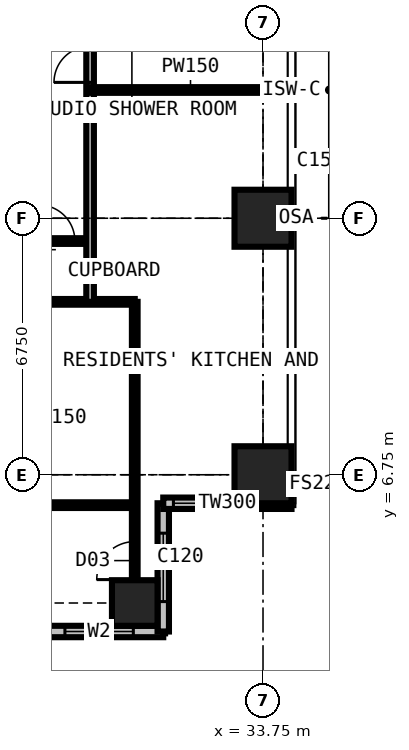
"""IFC4 building model, lengths in metres.
Left out: names, types, materials, properties, quantities, classifications, styles, units other than length and angle.
Written with IfcOpenShell. Run it as: python <this file> out.ifc"""

import sys

from ifc_helpers import new_model, si_unit, direction, frame, frame_2d, origin, origin_2d, place, context, subcontext, project, spatial, rectangle, extrude, element, fill, save


model = new_model("IFC4")
c1 = context("Model", 3, precision=1e-05, world=origin(), true_north=direction((0.0, 1.0)))
c2 = subcontext(c1, "Body", "Model", "MODEL_VIEW")
j1 = project(units=[si_unit("LENGTHUNIT", "METRE"), si_unit("PLANEANGLEUNIT", "RADIAN")], contexts=[c1])
p1 = place(None, origin())
s1 = spatial("IfcSite", under=j1, at=p1, CompositionType="ELEMENT")
p2 = place(p1, origin())
s2 = spatial("IfcBuilding", under=s1, at=p2, CompositionType="ELEMENT")
p3 = place(p2, frame((0.0, 0.0, 153.0)))
s3 = spatial("IfcBuildingStorey", under=s2, at=p3, CompositionType="ELEMENT", Elevation=153.0)
p4 = place(p3, frame((30.375, 3.375, 0.0), z_axis=(0.0, 0.0, 1.0), x_axis=(1.0, 0.0, 0.0)))
e1 = element("IfcColumn", 1, at=p4, inside=s3, PredefinedType="COLUMN", context=c2, shape_type="SweptSolid", body=[
    extrude(rectangle(XDim=1.2, YDim=1.2, at=origin_2d()), origin(), (0.0, 0.0, 1.0), 3.6),
])
for number, where, z_axis, x_axis in (
    (2, (33.75, 6.75, 0.0), (0.0, 0.0, 1.0), (1.0, 0.0, 0.0)),
    (3, (33.75, 13.5, 0.0), (0.0, 0.0, 1.0), (1.0, 0.0, 0.0)),
):
    element("IfcColumn", number, at=place(p3, frame(where, z_axis=z_axis, x_axis=x_axis)), inside=s3, PredefinedType="COLUMN", context=c2, shape_type="SweptSolid", body=[
        extrude(rectangle(XDim=1.5, YDim=1.5, at=origin_2d()), origin(), (0.0, 0.0, 1.0), 3.6),
    ])
p5 = place(p3, frame((27.75, 2.625, 0.0), z_axis=(0.0, 0.0, 1.0), x_axis=(1.0, 0.0, 0.0)))
e4 = element("IfcWall", 4, at=p5, inside=s3, PredefinedType="SOLIDWALL", context=c2, shape_type="SweptSolid", body=[
    extrude(rectangle(XDim=3.375, YDim=0.3, at=frame_2d((1.688, 0.0))), origin(), (0.0, 0.0, 1.0), 3.375),
])
p6 = place(p5, frame((0.788, 0.0, 0.6)))
e5 = element("IfcOpeningElement", 5, at=p6, cuts=e4, PredefinedType="OPENING", context=c2, shape_type="SweptSolid", body=[
    extrude(rectangle(XDim=1.8, YDim=2.1, at=frame_2d((0.9, 1.05))), frame((0.0, 0.16, 0.0), z_axis=(0.0, -1.0, 0.0), x_axis=(1.0, 0.0, 0.0)), (0.0, 0.0, 1.0), 0.32),
])
p7 = place(p3, frame((31.125, 2.625, 0.0), z_axis=(0.0, 0.0, 1.0), x_axis=(0.0, 1.0, 0.0)))
e6 = element("IfcWall", 6, at=p7, inside=s3, PredefinedType="SOLIDWALL", context=c2, shape_type="SweptSolid", body=[
    extrude(rectangle(XDim=3.375, YDim=0.3, at=frame_2d((1.688, 0.0))), origin(), (0.0, 0.0, 1.0), 3.375),
])
p8 = place(p7, frame((0.788, 0.0, 0.6)))
e7 = element("IfcOpeningElement", 7, at=p8, cuts=e6, PredefinedType="OPENING", context=c2, shape_type="SweptSolid", body=[
    extrude(rectangle(XDim=1.8, YDim=2.1, at=frame_2d((0.9, 1.05))), frame((0.0, 0.16, 0.0), z_axis=(0.0, -1.0, 0.0), x_axis=(1.0, 0.0, 0.0)), (0.0, 0.0, 1.0), 0.32),
])
p9 = place(p3, frame((31.125, 6.0, 0.0), z_axis=(0.0, 0.0, 1.0), x_axis=(1.0, 0.0, 0.0)))
e8 = element("IfcWall", 8, at=p9, inside=s3, PredefinedType="SOLIDWALL", context=c2, shape_type="SweptSolid", body=[
    extrude(rectangle(XDim=3.375, YDim=0.3, at=frame_2d((1.688, 0.0))), origin(), (0.0, 0.0, 1.0), 3.375),
])
p10 = place(p9, frame((0.268, 0.0, 0.9)))
e9 = element("IfcOpeningElement", 9, at=p10, cuts=e8, PredefinedType="OPENING", context=c2, shape_type="SweptSolid", body=[
    extrude(rectangle(XDim=1.5, YDim=1.8, at=frame_2d((0.75, 0.9))), frame((0.0, 0.16, 0.0), z_axis=(0.0, -1.0, 0.0), x_axis=(1.0, 0.0, 0.0)), (0.0, 0.0, 1.0), 0.32),
])
p11 = place(p3, frame((10.125, 11.3, 0.0), z_axis=(0.0, 0.0, 1.0), x_axis=(1.0, 0.0, 0.0)))
e10 = element("IfcWall", 10, at=p11, inside=s3, PredefinedType="PARTITIONING", context=c2, shape_type="SweptSolid", body=[
    extrude(rectangle(XDim=20.25, YDim=0.15, at=frame_2d((10.125, 0.0))), origin(), (0.0, 0.0, 1.0), 3.375),
])
p12 = place(p11, frame((5.2, 0.0, 0.0)))
e11 = element("IfcOpeningElement", 11, at=p12, cuts=e10, PredefinedType="OPENING", context=c2, shape_type="SweptSolid", body=[
    extrude(rectangle(XDim=1.0, YDim=2.2, at=frame_2d((0.5, 1.1))), frame((0.0, 0.085, 0.0), z_axis=(0.0, -1.0, 0.0), x_axis=(1.0, 0.0, 0.0)), (0.0, 0.0, 1.0), 0.17),
])
p13 = place(p11, frame((11.312, 0.0, 0.0)))
e12 = element("IfcOpeningElement", 12, at=p13, cuts=e10, PredefinedType="OPENING", context=c2, shape_type="SweptSolid", body=[
    extrude(rectangle(XDim=1.0, YDim=2.2, at=frame_2d((0.5, 1.1))), frame((0.0, 0.085, 0.0), z_axis=(0.0, -1.0, 0.0), x_axis=(1.0, 0.0, 0.0)), (0.0, 0.0, 1.0), 0.17),
])
p14 = place(p11, frame((2.425, 0.0, 0.0)))
e13 = element("IfcOpeningElement", 13, at=p14, cuts=e10, PredefinedType="OPENING", context=c2, shape_type="SweptSolid", body=[
    extrude(rectangle(XDim=0.95, YDim=2.2, at=frame_2d((0.475, 1.1))), frame((0.0, 0.085, 0.0), z_axis=(0.0, -1.0, 0.0), x_axis=(1.0, 0.0, 0.0)), (0.0, 0.0, 1.0), 0.17),
])
p15 = place(p3, frame((27.4, 12.9, 0.0), z_axis=(0.0, 0.0, 1.0), x_axis=(1.0, 0.0, 0.0)))
e14 = element("IfcWall", 14, at=p15, inside=s3, PredefinedType="PARTITIONING", context=c2, shape_type="SweptSolid", body=[
    extrude(rectangle(XDim=1.8, YDim=0.15, at=frame_2d((0.9, 0.0))), origin(), (0.0, 0.0, 1.0), 2.806),
])
p16 = place(p15, frame((0.45, 0.0, 0.0)))
e15 = element("IfcOpeningElement", 15, at=p16, cuts=e14, PredefinedType="OPENING", context=c2, shape_type="SweptSolid", body=[
    extrude(rectangle(XDim=0.95, YDim=2.2, at=frame_2d((0.475, 1.1))), frame((0.0, 0.085, 0.0), z_axis=(0.0, -1.0, 0.0), x_axis=(1.0, 0.0, 0.0)), (0.0, 0.0, 1.0), 0.17),
])
p17 = place(p3, frame((27.725, 5.95, 0.0), z_axis=(0.0, 0.0, 1.0), x_axis=(1.0, 0.0, 0.0)))
e16 = element("IfcWall", 16, at=p17, inside=s3, PredefinedType="PARTITIONING", context=c2, shape_type="SweptSolid", body=[
    extrude(rectangle(XDim=2.65, YDim=0.15, at=frame_2d((1.325, 0.0))), origin(), (0.0, 0.0, 1.0), 3.375),
])
p18 = place(p3, frame((29.2, 11.3, 0.0), z_axis=(0.0, 0.0, 1.0), x_axis=(0.0, 1.0, 0.0)))
e17 = element("IfcWall", 17, at=p18, inside=s3, PredefinedType="PARTITIONING", context=c2, shape_type="SweptSolid", body=[
    extrude(rectangle(XDim=17.9, YDim=0.2, at=frame_2d((8.95, 0.0))), origin(), (0.0, 0.0, 1.0), 3.375),
])
p19 = place(p18, frame((10.55, 0.0, 0.0)))
e18 = element("IfcOpeningElement", 18, at=p19, cuts=e17, PredefinedType="OPENING", context=c2, shape_type="SweptSolid", body=[
    extrude(rectangle(XDim=0.95, YDim=2.2, at=frame_2d((0.475, 1.1))), frame((0.0, 0.11, 0.0), z_axis=(0.0, -1.0, 0.0), x_axis=(1.0, 0.0, 0.0)), (0.0, 0.0, 1.0), 0.22),
])
p20 = place(p18, frame((5.775, 0.0, 0.0)))
e19 = element("IfcOpeningElement", 19, at=p20, cuts=e17, PredefinedType="OPENING", context=c2, shape_type="SweptSolid", body=[
    extrude(rectangle(XDim=0.95, YDim=2.2, at=frame_2d((0.475, 1.1))), frame((0.0, 0.11, 0.0), z_axis=(0.0, -1.0, 0.0), x_axis=(1.0, 0.0, 0.0)), (0.0, 0.0, 1.0), 0.22),
])
p21 = place(p18, frame((16.3, 0.0, 0.0)))
e20 = element("IfcOpeningElement", 20, at=p21, cuts=e17, PredefinedType="OPENING", context=c2, shape_type="SweptSolid", body=[
    extrude(rectangle(XDim=1.0, YDim=2.2, at=frame_2d((0.5, 1.1))), frame((0.0, 0.11, 0.0), z_axis=(0.0, -1.0, 0.0), x_axis=(1.0, 0.0, 0.0)), (0.0, 0.0, 1.0), 0.22),
])
p22 = place(p3, frame((29.2, 16.875, 0.0), z_axis=(0.0, 0.0, 1.0), x_axis=(1.0, 0.0, 0.0)))
e21 = element("IfcWall", 21, at=p22, inside=s3, PredefinedType="PARTITIONING", context=c2, shape_type="SweptSolid", body=[
    extrude(rectangle(XDim=5.284, YDim=0.15, at=frame_2d((2.642, 0.0))), origin(), (0.0, 0.0, 1.0), 3.375),
])
p23 = place(p3, frame((30.375, 2.775, 0.0), z_axis=(0.0, 0.0, 1.0), x_axis=(0.0, 1.0, 0.0)))
e22 = element("IfcWall", 22, at=p23, inside=s3, PredefinedType="PARTITIONING", context=c2, shape_type="SweptSolid", body=[
    extrude(rectangle(XDim=8.525, YDim=0.15, at=frame_2d((4.263, 0.0))), origin(), (0.0, 0.0, 1.0), 2.877),
])
p24 = place(p23, frame((1.216, 0.0, 0.0)))
e23 = element("IfcOpeningElement", 23, at=p24, cuts=e22, PredefinedType="OPENING", context=c2, shape_type="SweptSolid", body=[
    extrude(rectangle(XDim=1.0, YDim=2.2, at=frame_2d((0.5, 1.1))), frame((0.0, 0.085, 0.0), z_axis=(0.0, -1.0, 0.0), x_axis=(1.0, 0.0, 0.0)), (0.0, 0.0, 1.0), 0.17),
])
p25 = place(p6, origin())
e24 = element("IfcWindow", 24, at=p25, inside=s3, PartitioningType="SINGLE_PANEL", PredefinedType="WINDOW", context=c2, shape_type="SweptSolid", body=[
    extrude(rectangle(XDim=1.8, YDim=2.1, at=frame_2d((0.9, 1.05))), frame((0.0, 0.03, 0.0), z_axis=(0.0, -1.0, 0.0), x_axis=(1.0, 0.0, 0.0)), (0.0, 0.0, 1.0), 0.06),
])
fill(e5, e24)
p26 = place(p8, origin())
e25 = element("IfcWindow", 25, at=p26, inside=s3, PartitioningType="SINGLE_PANEL", PredefinedType="WINDOW", context=c2, shape_type="SweptSolid", body=[
    extrude(rectangle(XDim=1.8, YDim=2.1, at=frame_2d((0.9, 1.05))), frame((0.0, 0.03, 0.0), z_axis=(0.0, -1.0, 0.0), x_axis=(1.0, 0.0, 0.0)), (0.0, 0.0, 1.0), 0.06),
])
fill(e7, e25)
p27 = place(p10, origin())
e26 = element("IfcWindow", 26, at=p27, inside=s3, PartitioningType="SINGLE_PANEL", PredefinedType="WINDOW", context=c2, shape_type="SweptSolid", body=[
    extrude(rectangle(XDim=1.5, YDim=1.8, at=frame_2d((0.75, 0.9))), frame((0.0, 0.03, 0.0), z_axis=(0.0, -1.0, 0.0), x_axis=(1.0, 0.0, 0.0)), (0.0, 0.0, 1.0), 0.06),
])
fill(e9, e26)
p28 = place(p16, origin())
e27 = element("IfcDoor", 27, at=p28, inside=s3, OperationType="SINGLE_SWING_LEFT", PredefinedType="DOOR", context=c2, shape_type="SweptSolid", body=[
    extrude(rectangle(XDim=0.95, YDim=2.2, at=frame_2d((0.475, 1.1))), frame((0.0, 0.025, 0.0), z_axis=(0.0, -1.0, 0.0), x_axis=(1.0, 0.0, 0.0)), (0.0, 0.0, 1.0), 0.05),
])
fill(e15, e27)
p29 = place(p24, origin())
e28 = element("IfcDoor", 28, at=p29, inside=s3, OperationType="SINGLE_SWING_LEFT", PredefinedType="DOOR", context=c2, shape_type="SweptSolid", body=[
    extrude(rectangle(XDim=1.0, YDim=2.2, at=frame_2d((0.5, 1.1))), frame((0.0, 0.025, 0.0), z_axis=(0.0, -1.0, 0.0), x_axis=(1.0, 0.0, 0.0)), (0.0, 0.0, 1.0), 0.05),
])
fill(e23, e28)
p30 = place(p20, origin())
e29 = element("IfcDoor", 29, at=p30, inside=s3, OperationType="SINGLE_SWING_LEFT", PredefinedType="DOOR", context=c2, shape_type="SweptSolid", body=[
    extrude(rectangle(XDim=0.95, YDim=2.2, at=frame_2d((0.475, 1.1))), frame((0.0, 0.025, 0.0), z_axis=(0.0, -1.0, 0.0), x_axis=(1.0, 0.0, 0.0)), (0.0, 0.0, 1.0), 0.05),
])
fill(e19, e29)
save(model, sys.argv[1])
